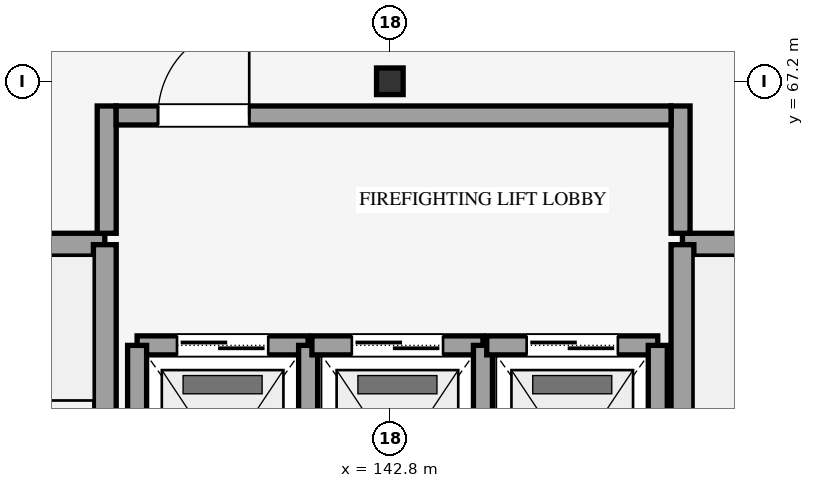
"""IFC4 building model, lengths in metres.
Left out: names, types, materials, properties, quantities, classifications, styles, units other than length and angle.
Written with IfcOpenShell. Run it as: python <this file> out.ifc"""

import sys

from ifc_helpers import new_model, si_unit, direction, frame, frame_2d, origin, origin_2d, place, context, subcontext, project, spatial, rectangle, i_section, extrude, element, fill, save


model = new_model("IFC4")
c1 = context("Model", 3, precision=1e-05, world=origin(), true_north=direction((0.0, 1.0)))
c2 = subcontext(c1, "Body", "Model", "MODEL_VIEW")
j1 = project(units=[si_unit("LENGTHUNIT", "METRE"), si_unit("PLANEANGLEUNIT", "RADIAN")], contexts=[c1])
p1 = place(None, origin())
s1 = spatial("IfcSite", under=j1, at=p1, CompositionType="ELEMENT")
p2 = place(p1, origin())
s2 = spatial("IfcBuilding", under=s1, at=p2, CompositionType="ELEMENT")
p3 = place(p2, frame((0.0, 0.0, 44.7)))
s3 = spatial("IfcBuildingStorey", under=s2, at=p3, CompositionType="ELEMENT", Elevation=44.7)
p4 = place(p3, frame((142.8, 67.2, 0.0), z_axis=(0.0, 0.0, 1.0), x_axis=(1.0, 0.0, 0.0)))
e1 = element("IfcColumn", 1, at=p4, inside=s3, PredefinedType="COLUMN", context=c2, shape_type="SweptSolid", body=[
    extrude(i_section(OverallWidth=0.35, OverallDepth=0.35, WebThickness=0.012, FlangeThickness=0.019, FilletRadius=0.02, at=origin_2d()), origin(), (0.0, 0.0, 1.0), 4.2),
])
p5 = place(p3, frame((135.05, 65.05, 0.0), z_axis=(0.0, 0.0, 1.0), x_axis=(1.0, 0.0, 0.0)))
e2 = element("IfcWall", 2, at=p5, inside=s3, PredefinedType="SHEAR", context=c2, shape_type="SweptSolid", body=[
    extrude(rectangle(XDim=4.0, YDim=0.3, at=frame_2d((2.0, 0.0))), origin(), (0.0, 0.0, 1.0), 4.2),
])
p6 = place(p3, frame((139.05, 50.75, 0.0), z_axis=(0.0, 0.0, 1.0), x_axis=(0.0, 1.0, 0.0)))
e3 = element("IfcWall", 3, at=p6, inside=s3, PredefinedType="SHEAR", context=c2, shape_type="SweptSolid", body=[
    extrude(rectangle(XDim=14.3, YDim=0.3, at=frame_2d((7.15, 0.0))), origin(), (0.0, 0.0, 1.0), 4.2),
])
p7 = place(p3, frame((146.65, 65.05, 0.0), z_axis=(0.0, 0.0, 1.0), x_axis=(1.0, 0.0, 0.0)))
e4 = element("IfcWall", 4, at=p7, inside=s3, PredefinedType="SHEAR", context=c2, shape_type="SweptSolid", body=[
    extrude(rectangle(XDim=4.0, YDim=0.3, at=frame_2d((2.0, 0.0))), origin(), (0.0, 0.0, 1.0), 4.2),
])
p8 = place(p3, frame((146.65, 50.75, 0.0), z_axis=(0.0, 0.0, 1.0), x_axis=(0.0, 1.0, 0.0)))
e5 = element("IfcWall", 5, at=p8, inside=s3, PredefinedType="SHEAR", context=c2, shape_type="SweptSolid", body=[
    extrude(rectangle(XDim=14.3, YDim=0.3, at=frame_2d((7.15, 0.0))), origin(), (0.0, 0.0, 1.0), 4.2),
])
p9 = place(p3, frame((139.475, 63.725, 0.0), z_axis=(0.0, 0.0, 1.0), x_axis=(1.0, 0.0, 0.0)))
e6 = element("IfcWall", 6, at=p9, inside=s3, PredefinedType="SHEAR", context=c2, shape_type="SweptSolid", body=[
    extrude(rectangle(XDim=2.25, YDim=0.25, at=frame_2d((1.125, 0.0))), origin(), (0.0, 0.0, 1.0), 3.96),
])
p10 = place(p9, frame((0.525, 0.0, 0.0)))
e7 = element("IfcOpeningElement", 7, at=p10, cuts=e6, PredefinedType="OPENING", context=c2, shape_type="SweptSolid", body=[
    extrude(rectangle(XDim=1.2, YDim=2.18, at=frame_2d((0.6, 1.09))), frame((0.0, 0.135, 0.0), z_axis=(0.0, -1.0, 0.0), x_axis=(1.0, 0.0, 0.0)), (0.0, 0.0, 1.0), 0.27),
])
for number, where, z_axis, x_axis in (
    (8, (139.475, 60.675, 0.0), (0.0, 0.0, 1.0), (0.0, 1.0, 0.0)),
    (9, (141.725, 60.675, 0.0), (0.0, 0.0, 1.0), (0.0, 1.0, 0.0)),
):
    element("IfcWall", number, at=place(p3, frame(where, z_axis=z_axis, x_axis=x_axis)), inside=s3, PredefinedType="SHEAR", context=c2, shape_type="SweptSolid", body=[
        extrude(rectangle(XDim=3.05, YDim=0.25, at=frame_2d((1.525, 0.0))), origin(), (0.0, 0.0, 1.0), 3.96),
    ])
p11 = place(p3, frame((141.775, 63.725, 0.0), z_axis=(0.0, 0.0, 1.0), x_axis=(1.0, 0.0, 0.0)))
e10 = element("IfcWall", 10, at=p11, inside=s3, PredefinedType="SHEAR", context=c2, shape_type="SweptSolid", body=[
    extrude(rectangle(XDim=2.25, YDim=0.25, at=frame_2d((1.125, 0.0))), origin(), (0.0, 0.0, 1.0), 3.96),
])
p12 = place(p11, frame((0.525, 0.0, 0.0)))
e11 = element("IfcOpeningElement", 11, at=p12, cuts=e10, PredefinedType="OPENING", context=c2, shape_type="SweptSolid", body=[
    extrude(rectangle(XDim=1.2, YDim=2.18, at=frame_2d((0.6, 1.09))), frame((0.0, 0.135, 0.0), z_axis=(0.0, -1.0, 0.0), x_axis=(1.0, 0.0, 0.0)), (0.0, 0.0, 1.0), 0.27),
])
p13 = place(p3, frame((144.025, 60.675, 0.0), z_axis=(0.0, 0.0, 1.0), x_axis=(0.0, 1.0, 0.0)))
e12 = element("IfcWall", 12, at=p13, inside=s3, PredefinedType="SHEAR", context=c2, shape_type="SweptSolid", body=[
    extrude(rectangle(XDim=3.05, YDim=0.25, at=frame_2d((1.525, 0.0))), origin(), (0.0, 0.0, 1.0), 3.96),
])
p14 = place(p3, frame((144.075, 63.725, 0.0), z_axis=(0.0, 0.0, 1.0), x_axis=(1.0, 0.0, 0.0)))
e13 = element("IfcWall", 13, at=p14, inside=s3, PredefinedType="SHEAR", context=c2, shape_type="SweptSolid", body=[
    extrude(rectangle(XDim=2.25, YDim=0.25, at=frame_2d((1.125, 0.0))), origin(), (0.0, 0.0, 1.0), 3.96),
])
p15 = place(p14, frame((0.525, 0.0, 0.0)))
e14 = element("IfcOpeningElement", 14, at=p15, cuts=e13, PredefinedType="OPENING", context=c2, shape_type="SweptSolid", body=[
    extrude(rectangle(XDim=1.2, YDim=2.18, at=frame_2d((0.6, 1.09))), frame((0.0, 0.135, 0.0), z_axis=(0.0, -1.0, 0.0), x_axis=(1.0, 0.0, 0.0)), (0.0, 0.0, 1.0), 0.27),
])
p16 = place(p3, frame((146.325, 60.675, 0.0), z_axis=(0.0, 0.0, 1.0), x_axis=(0.0, 1.0, 0.0)))
e15 = element("IfcWall", 15, at=p16, inside=s3, PredefinedType="SHEAR", context=c2, shape_type="SweptSolid", body=[
    extrude(rectangle(XDim=3.05, YDim=0.25, at=frame_2d((1.525, 0.0))), origin(), (0.0, 0.0, 1.0), 3.96),
])
for number, where, z_axis, x_axis in (
    (16, (139.075, 65.2, 0.0), (0.0, 0.0, 1.0), (0.0, 1.0, 0.0)),
    (17, (146.625, 65.2, 0.0), (0.0, 0.0, 1.0), (0.0, 1.0, 0.0)),
):
    element("IfcWall", number, at=place(p3, frame(where, z_axis=z_axis, x_axis=x_axis)), inside=s3, PredefinedType="SHEAR", context=c2, shape_type="SweptSolid", body=[
        extrude(rectangle(XDim=1.675, YDim=0.25, at=frame_2d((0.837, 0.0))), origin(), (0.0, 0.0, 1.0), 3.96),
    ])
p17 = place(p3, frame((139.2, 66.75, 0.0), z_axis=(0.0, 0.0, 1.0), x_axis=(1.0, 0.0, 0.0)))
e18 = element("IfcWall", 18, at=p17, inside=s3, PredefinedType="SHEAR", context=c2, shape_type="SweptSolid", body=[
    extrude(rectangle(XDim=7.3, YDim=0.25, at=frame_2d((3.65, 0.0))), origin(), (0.0, 0.0, 1.0), 3.96),
])
p18 = place(p17, frame((0.55, 0.0, 0.0)))
e19 = element("IfcOpeningElement", 19, at=p18, cuts=e18, PredefinedType="OPENING", context=c2, shape_type="SweptSolid", body=[
    extrude(rectangle(XDim=1.2, YDim=2.15, at=frame_2d((0.6, 1.075))), frame((0.0, 0.135, 0.0), z_axis=(0.0, -1.0, 0.0), x_axis=(1.0, 0.0, 0.0)), (0.0, 0.0, 1.0), 0.27),
])
p19 = place(p10, origin())
e20 = element("IfcDoor", 20, at=p19, inside=s3, OperationType="DOUBLE_DOOR_SLIDING", PredefinedType="DOOR", context=c2, shape_type="SweptSolid", body=[
    extrude(rectangle(XDim=1.2, YDim=2.18, at=frame_2d((0.6, 1.09))), frame((0.0, 0.025, 0.0), z_axis=(0.0, -1.0, 0.0), x_axis=(1.0, 0.0, 0.0)), (0.0, 0.0, 1.0), 0.05),
])
fill(e7, e20)
p20 = place(p12, origin())
e21 = element("IfcDoor", 21, at=p20, inside=s3, OperationType="DOUBLE_DOOR_SLIDING", PredefinedType="DOOR", context=c2, shape_type="SweptSolid", body=[
    extrude(rectangle(XDim=1.2, YDim=2.18, at=frame_2d((0.6, 1.09))), frame((0.0, 0.025, 0.0), z_axis=(0.0, -1.0, 0.0), x_axis=(1.0, 0.0, 0.0)), (0.0, 0.0, 1.0), 0.05),
])
fill(e11, e21)
p21 = place(p15, origin())
e22 = element("IfcDoor", 22, at=p21, inside=s3, OperationType="DOUBLE_DOOR_SLIDING", PredefinedType="DOOR", context=c2, shape_type="SweptSolid", body=[
    extrude(rectangle(XDim=1.2, YDim=2.18, at=frame_2d((0.6, 1.09))), frame((0.0, 0.025, 0.0), z_axis=(0.0, -1.0, 0.0), x_axis=(1.0, 0.0, 0.0)), (0.0, 0.0, 1.0), 0.05),
])
fill(e14, e22)
p22 = place(p18, origin())
e23 = element("IfcDoor", 23, at=p22, inside=s3, OperationType="SINGLE_SWING_RIGHT", PredefinedType="DOOR", context=c2, shape_type="SweptSolid", body=[
    extrude(rectangle(XDim=1.2, YDim=2.15, at=frame_2d((0.6, 1.075))), frame((0.0, 0.025, 0.0), z_axis=(0.0, -1.0, 0.0), x_axis=(1.0, 0.0, 0.0)), (0.0, 0.0, 1.0), 0.05),
])
fill(e19, e23)
save(model, sys.argv[1])
